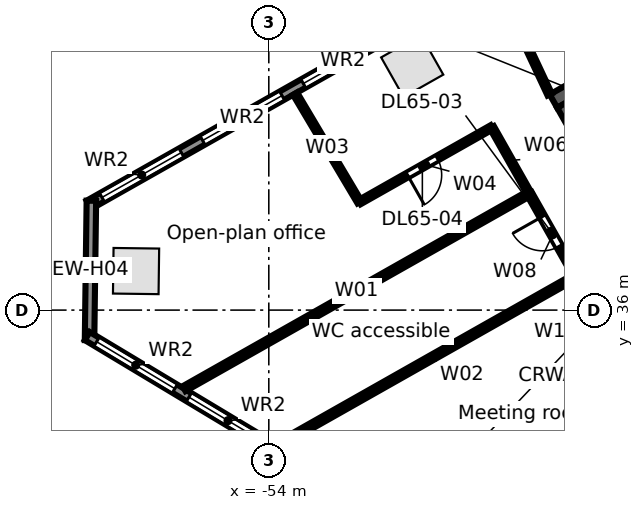
"""IFC4 building model, lengths in metres.
Left out: names, types, materials, properties, quantities, classifications, styles, units other than length and angle.
Written with IfcOpenShell. Run it as: python <this file> out.ifc"""

import sys

from ifc_helpers import new_model, si_unit, direction, frame, frame_2d, origin, origin_2d, place, context, subcontext, project, spatial, rectangle, extrude, element, fill, save


model = new_model("IFC4")
c1 = context("Model", 3, precision=1e-05, world=origin(), true_north=direction((0.0, 1.0)))
c2 = subcontext(c1, "Body", "Model", "MODEL_VIEW")
j1 = project(units=[si_unit("LENGTHUNIT", "METRE"), si_unit("PLANEANGLEUNIT", "RADIAN")], contexts=[c1])
p1 = place(None, origin())
s1 = spatial("IfcSite", under=j1, at=p1, CompositionType="ELEMENT")
p2 = place(p1, origin())
s2 = spatial("IfcBuilding", under=s1, at=p2, CompositionType="ELEMENT")
p3 = place(p2, frame((0.0, 0.0, 300.7)))
s3 = spatial("IfcBuildingStorey", under=s2, at=p3, CompositionType="ELEMENT", Elevation=300.7)
for number, where, z_axis, x_axis in (
    (1, (-50.226, 42.423, 0.0), (0.0, 0.0, 1.0), (-0.87, -0.492, 0.0)),
    (2, (-57.493, 37.027, 0.0), (0.0, 0.0, 1.0), (-0.013, -1.0, 0.0)),
):
    element("IfcColumn", number, at=place(p3, frame(where, z_axis=z_axis, x_axis=x_axis)), inside=s3, PredefinedType="COLUMN", context=c2, shape_type="SweptSolid", body=[
        extrude(rectangle(XDim=1.2, YDim=1.2, at=origin_2d()), origin(), (0.0, 0.0, 1.0), 3.8),
    ])
p4 = place(p3, frame((-58.732, 38.771, 0.0), z_axis=(0.0, 0.0, 1.0), x_axis=(0.870355615581, 0.492423702137, 0.0)))
e3 = element("IfcWall", 3, at=p4, inside=s3, PredefinedType="STANDARD", context=c2, shape_type="SweptSolid", body=[
    extrude(rectangle(XDim=64.052, YDim=0.25, at=frame_2d((32.026, 0.0))), origin(), (0.0, 0.0, 1.0), 3.52),
])
p5 = place(p4, frame((61.259, 0.0, 0.8)))
e4 = element("IfcOpeningElement", 4, at=p5, cuts=e3, PredefinedType="OPENING", context=c2, shape_type="SweptSolid", body=[
    extrude(rectangle(XDim=2.4, YDim=2.2, at=frame_2d((1.2, 1.1))), frame((0.0, 0.135, 0.0), z_axis=(0.0, -1.0, 0.0), x_axis=(1.0, 0.0, 0.0)), (0.0, 0.0, 1.0), 0.27),
])
p6 = place(p4, frame((58.216, 0.0, 0.8)))
e5 = element("IfcOpeningElement", 5, at=p6, cuts=e3, PredefinedType="OPENING", context=c2, shape_type="SweptSolid", body=[
    extrude(rectangle(XDim=2.4, YDim=2.2, at=frame_2d((1.2, 1.1))), frame((0.0, 0.135, 0.0), z_axis=(0.0, -1.0, 0.0), x_axis=(1.0, 0.0, 0.0)), (0.0, 0.0, 1.0), 0.27),
])
p7 = place(p4, frame((55.173, 0.0, 0.8)))
e6 = element("IfcOpeningElement", 6, at=p7, cuts=e3, PredefinedType="OPENING", context=c2, shape_type="SweptSolid", body=[
    extrude(rectangle(XDim=2.4, YDim=2.2, at=frame_2d((1.2, 1.1))), frame((0.0, 0.135, 0.0), z_axis=(0.0, -1.0, 0.0), x_axis=(1.0, 0.0, 0.0)), (0.0, 0.0, 1.0), 0.27),
])
p8 = place(p4, frame((52.129, 0.0, 0.8)))
e7 = element("IfcOpeningElement", 7, at=p8, cuts=e3, PredefinedType="OPENING", context=c2, shape_type="SweptSolid", body=[
    extrude(rectangle(XDim=2.4, YDim=2.2, at=frame_2d((1.2, 1.1))), frame((0.0, 0.135, 0.0), z_axis=(0.0, -1.0, 0.0), x_axis=(1.0, 0.0, 0.0)), (0.0, 0.0, 1.0), 0.27),
])
p9 = place(p4, frame((49.086, 0.0, 0.8)))
e8 = element("IfcOpeningElement", 8, at=p9, cuts=e3, PredefinedType="OPENING", context=c2, shape_type="SweptSolid", body=[
    extrude(rectangle(XDim=2.4, YDim=2.2, at=frame_2d((1.2, 1.1))), frame((0.0, 0.135, 0.0), z_axis=(0.0, -1.0, 0.0), x_axis=(1.0, 0.0, 0.0)), (0.0, 0.0, 1.0), 0.27),
])
p10 = place(p4, frame((46.043, 0.0, 0.8)))
e9 = element("IfcOpeningElement", 9, at=p10, cuts=e3, PredefinedType="OPENING", context=c2, shape_type="SweptSolid", body=[
    extrude(rectangle(XDim=2.4, YDim=2.2, at=frame_2d((1.2, 1.1))), frame((0.0, 0.135, 0.0), z_axis=(0.0, -1.0, 0.0), x_axis=(1.0, 0.0, 0.0)), (0.0, 0.0, 1.0), 0.27),
])
p11 = place(p4, frame((43.0, 0.0, 0.8)))
e10 = element("IfcOpeningElement", 10, at=p11, cuts=e3, PredefinedType="OPENING", context=c2, shape_type="SweptSolid", body=[
    extrude(rectangle(XDim=2.4, YDim=2.2, at=frame_2d((1.2, 1.1))), frame((0.0, 0.135, 0.0), z_axis=(0.0, -1.0, 0.0), x_axis=(1.0, 0.0, 0.0)), (0.0, 0.0, 1.0), 0.27),
])
p12 = place(p4, frame((39.956, 0.0, 0.8)))
e11 = element("IfcOpeningElement", 11, at=p12, cuts=e3, PredefinedType="OPENING", context=c2, shape_type="SweptSolid", body=[
    extrude(rectangle(XDim=2.4, YDim=2.2, at=frame_2d((1.2, 1.1))), frame((0.0, 0.135, 0.0), z_axis=(0.0, -1.0, 0.0), x_axis=(1.0, 0.0, 0.0)), (0.0, 0.0, 1.0), 0.27),
])
p13 = place(p4, frame((36.913, 0.0, 0.8)))
e12 = element("IfcOpeningElement", 12, at=p13, cuts=e3, PredefinedType="OPENING", context=c2, shape_type="SweptSolid", body=[
    extrude(rectangle(XDim=2.4, YDim=2.2, at=frame_2d((1.2, 1.1))), frame((0.0, 0.135, 0.0), z_axis=(0.0, -1.0, 0.0), x_axis=(1.0, 0.0, 0.0)), (0.0, 0.0, 1.0), 0.27),
])
p14 = place(p4, frame((33.87, 0.0, 0.8)))
e13 = element("IfcOpeningElement", 13, at=p14, cuts=e3, PredefinedType="OPENING", context=c2, shape_type="SweptSolid", body=[
    extrude(rectangle(XDim=2.4, YDim=2.2, at=frame_2d((1.2, 1.1))), frame((0.0, 0.135, 0.0), z_axis=(0.0, -1.0, 0.0), x_axis=(1.0, 0.0, 0.0)), (0.0, 0.0, 1.0), 0.27),
])
p15 = place(p4, frame((30.826, 0.0, 0.8)))
e14 = element("IfcOpeningElement", 14, at=p15, cuts=e3, PredefinedType="OPENING", context=c2, shape_type="SweptSolid", body=[
    extrude(rectangle(XDim=2.4, YDim=2.2, at=frame_2d((1.2, 1.1))), frame((0.0, 0.135, 0.0), z_axis=(0.0, -1.0, 0.0), x_axis=(1.0, 0.0, 0.0)), (0.0, 0.0, 1.0), 0.27),
])
p16 = place(p4, frame((27.783, 0.0, 0.8)))
e15 = element("IfcOpeningElement", 15, at=p16, cuts=e3, PredefinedType="OPENING", context=c2, shape_type="SweptSolid", body=[
    extrude(rectangle(XDim=2.4, YDim=2.2, at=frame_2d((1.2, 1.1))), frame((0.0, 0.135, 0.0), z_axis=(0.0, -1.0, 0.0), x_axis=(1.0, 0.0, 0.0)), (0.0, 0.0, 1.0), 0.27),
])
p17 = place(p4, frame((24.74, 0.0, 0.8)))
e16 = element("IfcOpeningElement", 16, at=p17, cuts=e3, PredefinedType="OPENING", context=c2, shape_type="SweptSolid", body=[
    extrude(rectangle(XDim=2.4, YDim=2.2, at=frame_2d((1.2, 1.1))), frame((0.0, 0.135, 0.0), z_axis=(0.0, -1.0, 0.0), x_axis=(1.0, 0.0, 0.0)), (0.0, 0.0, 1.0), 0.27),
])
p18 = place(p4, frame((21.696, 0.0, 0.8)))
e17 = element("IfcOpeningElement", 17, at=p18, cuts=e3, PredefinedType="OPENING", context=c2, shape_type="SweptSolid", body=[
    extrude(rectangle(XDim=2.4, YDim=2.2, at=frame_2d((1.2, 1.1))), frame((0.0, 0.135, 0.0), z_axis=(0.0, -1.0, 0.0), x_axis=(1.0, 0.0, 0.0)), (0.0, 0.0, 1.0), 0.27),
])
p19 = place(p4, frame((18.653, 0.0, 0.8)))
e18 = element("IfcOpeningElement", 18, at=p19, cuts=e3, PredefinedType="OPENING", context=c2, shape_type="SweptSolid", body=[
    extrude(rectangle(XDim=2.4, YDim=2.2, at=frame_2d((1.2, 1.1))), frame((0.0, 0.135, 0.0), z_axis=(0.0, -1.0, 0.0), x_axis=(1.0, 0.0, 0.0)), (0.0, 0.0, 1.0), 0.27),
])
p20 = place(p4, frame((15.61, 0.0, 0.8)))
e19 = element("IfcOpeningElement", 19, at=p20, cuts=e3, PredefinedType="OPENING", context=c2, shape_type="SweptSolid", body=[
    extrude(rectangle(XDim=2.4, YDim=2.2, at=frame_2d((1.2, 1.1))), frame((0.0, 0.135, 0.0), z_axis=(0.0, -1.0, 0.0), x_axis=(1.0, 0.0, 0.0)), (0.0, 0.0, 1.0), 0.27),
])
p21 = place(p4, frame((12.567, 0.0, 0.8)))
e20 = element("IfcOpeningElement", 20, at=p21, cuts=e3, PredefinedType="OPENING", context=c2, shape_type="SweptSolid", body=[
    extrude(rectangle(XDim=2.4, YDim=2.2, at=frame_2d((1.2, 1.1))), frame((0.0, 0.135, 0.0), z_axis=(0.0, -1.0, 0.0), x_axis=(1.0, 0.0, 0.0)), (0.0, 0.0, 1.0), 0.27),
])
p22 = place(p4, frame((9.523, 0.0, 0.8)))
e21 = element("IfcOpeningElement", 21, at=p22, cuts=e3, PredefinedType="OPENING", context=c2, shape_type="SweptSolid", body=[
    extrude(rectangle(XDim=2.4, YDim=2.2, at=frame_2d((1.2, 1.1))), frame((0.0, 0.135, 0.0), z_axis=(0.0, -1.0, 0.0), x_axis=(1.0, 0.0, 0.0)), (0.0, 0.0, 1.0), 0.27),
])
p23 = place(p4, frame((6.48, 0.0, 0.8)))
e22 = element("IfcOpeningElement", 22, at=p23, cuts=e3, PredefinedType="OPENING", context=c2, shape_type="SweptSolid", body=[
    extrude(rectangle(XDim=2.4, YDim=2.2, at=frame_2d((1.2, 1.1))), frame((0.0, 0.135, 0.0), z_axis=(0.0, -1.0, 0.0), x_axis=(1.0, 0.0, 0.0)), (0.0, 0.0, 1.0), 0.27),
])
p24 = place(p4, frame((3.437, 0.0, 0.8)))
e23 = element("IfcOpeningElement", 23, at=p24, cuts=e3, PredefinedType="OPENING", context=c2, shape_type="SweptSolid", body=[
    extrude(rectangle(XDim=2.4, YDim=2.2, at=frame_2d((1.2, 1.1))), frame((0.0, 0.135, 0.0), z_axis=(0.0, -1.0, 0.0), x_axis=(1.0, 0.0, 0.0)), (0.0, 0.0, 1.0), 0.27),
])
p25 = place(p4, frame((0.393, 0.0, 0.8)))
e24 = element("IfcOpeningElement", 24, at=p25, cuts=e3, PredefinedType="OPENING", context=c2, shape_type="SweptSolid", body=[
    extrude(rectangle(XDim=2.4, YDim=2.2, at=frame_2d((1.2, 1.1))), frame((0.0, 0.135, 0.0), z_axis=(0.0, -1.0, 0.0), x_axis=(1.0, 0.0, 0.0)), (0.0, 0.0, 1.0), 0.27),
])
p26 = place(p3, frame((-58.717, 35.208, 0.0), z_axis=(0.0, 0.0, 1.0), x_axis=(0.01310512158, 0.999914124207, 0.0)))
e25 = element("IfcWall", 25, at=p26, inside=s3, PredefinedType="STANDARD", context=c2, shape_type="SweptSolid", body=[
    extrude(rectangle(XDim=3.67, YDim=0.25, at=frame_2d((1.835, 0.0))), origin(), (0.0, 0.0, 1.0), 3.52),
])
p27 = place(p3, frame((-44.115, 26.507, 0.0), z_axis=(0.0, 0.0, 1.0), x_axis=(-0.857166583633, 0.515039268311, 0.0)))
e26 = element("IfcWall", 26, at=p27, inside=s3, PredefinedType="STANDARD", context=c2, shape_type="SweptSolid", body=[
    extrude(rectangle(XDim=17.106, YDim=0.25, at=frame_2d((8.553, 0.0))), origin(), (0.0, 0.0, 1.0), 3.52),
])
p28 = place(p27, frame((14.417, 0.0, 0.8)))
e27 = element("IfcOpeningElement", 27, at=p28, cuts=e26, PredefinedType="OPENING", context=c2, shape_type="SweptSolid", body=[
    extrude(rectangle(XDim=2.4, YDim=2.2, at=frame_2d((1.2, 1.1))), frame((0.0, 0.135, 0.0), z_axis=(0.0, -1.0, 0.0), x_axis=(1.0, 0.0, 0.0)), (0.0, 0.0, 1.0), 0.27),
])
p29 = place(p27, frame((11.584, 0.0, 0.8)))
e28 = element("IfcOpeningElement", 28, at=p29, cuts=e26, PredefinedType="OPENING", context=c2, shape_type="SweptSolid", body=[
    extrude(rectangle(XDim=2.4, YDim=2.2, at=frame_2d((1.2, 1.1))), frame((0.0, 0.135, 0.0), z_axis=(0.0, -1.0, 0.0), x_axis=(1.0, 0.0, 0.0)), (0.0, 0.0, 1.0), 0.27),
])
p30 = place(p27, frame((8.75, 0.0, 0.8)))
e29 = element("IfcOpeningElement", 29, at=p30, cuts=e26, PredefinedType="OPENING", context=c2, shape_type="SweptSolid", body=[
    extrude(rectangle(XDim=2.4, YDim=2.2, at=frame_2d((1.2, 1.1))), frame((0.0, 0.135, 0.0), z_axis=(0.0, -1.0, 0.0), x_axis=(1.0, 0.0, 0.0)), (0.0, 0.0, 1.0), 0.27),
])
p31 = place(p27, frame((5.917, 0.0, 0.8)))
e30 = element("IfcOpeningElement", 30, at=p31, cuts=e26, PredefinedType="OPENING", context=c2, shape_type="SweptSolid", body=[
    extrude(rectangle(XDim=2.4, YDim=2.2, at=frame_2d((1.2, 1.1))), frame((0.0, 0.135, 0.0), z_axis=(0.0, -1.0, 0.0), x_axis=(1.0, 0.0, 0.0)), (0.0, 0.0, 1.0), 0.27),
])
p32 = place(p27, frame((3.084, 0.0, 0.8)))
e31 = element("IfcOpeningElement", 31, at=p32, cuts=e26, PredefinedType="OPENING", context=c2, shape_type="SweptSolid", body=[
    extrude(rectangle(XDim=2.4, YDim=2.2, at=frame_2d((1.2, 1.1))), frame((0.0, 0.135, 0.0), z_axis=(0.0, -1.0, 0.0), x_axis=(1.0, 0.0, 0.0)), (0.0, 0.0, 1.0), 0.27),
])
p33 = place(p27, frame((0.25, 0.0, 0.8)))
e32 = element("IfcOpeningElement", 32, at=p33, cuts=e26, PredefinedType="OPENING", context=c2, shape_type="SweptSolid", body=[
    extrude(rectangle(XDim=2.4, YDim=2.2, at=frame_2d((1.2, 1.1))), frame((0.0, 0.135, 0.0), z_axis=(0.0, -1.0, 0.0), x_axis=(1.0, 0.0, 0.0)), (0.0, 0.0, 1.0), 0.27),
])
p34 = place(p3, frame((-46.51, 41.499, 0.0), z_axis=(0.0, 0.0, 1.0), x_axis=(0.870356271124, 0.492422543467, 0.0)))
e33 = element("IfcWall", 33, at=p34, inside=s3, PredefinedType="SOLIDWALL", context=c2, shape_type="SweptSolid", body=[
    extrude(rectangle(XDim=17.0, YDim=0.4, at=frame_2d((8.5, 0.0))), origin(), (0.0, 0.0, 1.0), 3.52),
])
p35 = place(p3, frame((-46.238, 41.423, 0.0), z_axis=(0.0, 0.0, 1.0), x_axis=(0.492421663121, -0.870356769198, 0.0)))
e34 = element("IfcWall", 34, at=p35, inside=s3, PredefinedType="SOLIDWALL", context=c2, shape_type="SweptSolid", body=[
    extrude(rectangle(XDim=13.2, YDim=0.4, at=frame_2d((6.6, 0.0))), origin(), (0.0, 0.0, 1.0), 3.52),
])
p36 = place(p3, frame((-56.229, 33.932, 0.0), z_axis=(0.0, 0.0, 1.0), x_axis=(0.870363189886, 0.492410314364, 0.0)))
e35 = element("IfcWall", 35, at=p36, inside=s3, PredefinedType="PARTITIONING", context=c2, shape_type="SweptSolid", body=[
    extrude(rectangle(XDim=10.435, YDim=0.15, at=frame_2d((5.217, 0.0))), origin(), (0.0, 0.0, 1.0), 2.8),
])
p37 = place(p3, frame((-53.767, 32.453, 0.0), z_axis=(0.0, 0.0, 1.0), x_axis=(0.870345499828, 0.492441581235, 0.0)))
e36 = element("IfcWall", 36, at=p37, inside=s3, PredefinedType="PARTITIONING", context=c2, shape_type="SweptSolid", body=[
    extrude(rectangle(XDim=9.021, YDim=0.15, at=frame_2d((4.51, 0.0))), origin(), (0.0, 0.0, 1.0), 2.8),
])
p38 = place(p3, frame((-53.309, 41.696, 0.0), z_axis=(0.0, 0.0, 1.0), x_axis=(0.510739180143, -0.859735709312, 0.0)))
e37 = element("IfcWall", 37, at=p38, inside=s3, PredefinedType="PARTITIONING", context=c2, shape_type="SweptSolid", body=[
    extrude(rectangle(XDim=3.321, YDim=0.125, at=frame_2d((1.66, 0.0))), origin(), (0.0, 0.0, 1.0), 2.894),
])
p39 = place(p3, frame((-51.613, 38.841, 0.0), z_axis=(0.0, 0.0, 1.0), x_axis=(0.870297830159, 0.492525823506, 0.0)))
e38 = element("IfcWall", 38, at=p39, inside=s3, PredefinedType="PARTITIONING", context=c2, shape_type="SweptSolid", body=[
    extrude(rectangle(XDim=4.0, YDim=0.125, at=frame_2d((2.0, 0.0))), origin(), (0.0, 0.0, 1.0), 2.8),
])
p40 = place(p39, frame((1.45, 0.0, 0.0)))
e39 = element("IfcOpeningElement", 39, at=p40, cuts=e38, PredefinedType="OPENING", context=c2, shape_type="SweptSolid", body=[
    extrude(rectangle(XDim=0.9, YDim=2.1, at=frame_2d((0.45, 1.05))), frame((0.0, 0.073, 0.0), z_axis=(0.0, -1.0, 0.0), x_axis=(1.0, 0.0, 0.0)), (0.0, 0.0, 1.0), 0.145),
])
p41 = place(p3, frame((-48.132, 40.811, 0.0), z_axis=(0.0, 0.0, 1.0), x_axis=(0.492467412326, -0.870330884088, 0.0)))
e40 = element("IfcWall", 40, at=p41, inside=s3, PredefinedType="PARTITIONING", context=c2, shape_type="SweptSolid", body=[
    extrude(rectangle(XDim=2.0, YDim=0.125, at=frame_2d((1.0, 0.0))), origin(), (0.0, 0.0, 1.0), 3.52),
])
p42 = place(p3, frame((-48.022, 44.687, 0.0), z_axis=(0.0, 0.0, 1.0), x_axis=(0.424510917438, -0.905422818895, 0.0)))
e41 = element("IfcWall", 41, at=p42, inside=s3, PredefinedType="PARTITIONING", context=c2, shape_type="SweptSolid", body=[
    extrude(rectangle(XDim=3.329, YDim=0.125, at=frame_2d((1.665, 0.0))), origin(), (0.0, 0.0, 1.0), 2.888),
])
p43 = place(p3, frame((-47.147, 39.07, 0.0), z_axis=(0.0, 0.0, 1.0), x_axis=(0.492536798944, -0.870291618761, 0.0)))
e42 = element("IfcWall", 42, at=p43, inside=s3, PredefinedType="PARTITIONING", context=c2, shape_type="SweptSolid", body=[
    extrude(rectangle(XDim=2.499, YDim=0.15, at=frame_2d((1.25, 0.0))), origin(), (0.0, 0.0, 1.0), 3.52),
])
p44 = place(p43, frame((0.7, 0.0, 0.0)))
e43 = element("IfcOpeningElement", 43, at=p44, cuts=e42, PredefinedType="OPENING", context=c2, shape_type="SweptSolid", body=[
    extrude(rectangle(XDim=0.9, YDim=2.1, at=frame_2d((0.45, 1.05))), frame((0.0, 0.085, 0.0), z_axis=(0.0, -1.0, 0.0), x_axis=(1.0, 0.0, 0.0)), (0.0, 0.0, 1.0), 0.17),
])
p45 = place(p23, origin())
e44 = element("IfcWindow", 44, at=p45, inside=s3, PartitioningType="SINGLE_PANEL", PredefinedType="WINDOW", context=c2, shape_type="SweptSolid", body=[
    extrude(rectangle(XDim=2.4, YDim=2.2, at=frame_2d((1.2, 1.1))), frame((0.0, 0.03, 0.0), z_axis=(0.0, -1.0, 0.0), x_axis=(1.0, 0.0, 0.0)), (0.0, 0.0, 1.0), 0.06),
])
fill(e22, e44)
p46 = place(p24, origin())
e45 = element("IfcWindow", 45, at=p46, inside=s3, PartitioningType="SINGLE_PANEL", PredefinedType="WINDOW", context=c2, shape_type="SweptSolid", body=[
    extrude(rectangle(XDim=2.4, YDim=2.2, at=frame_2d((1.2, 1.1))), frame((0.0, 0.03, 0.0), z_axis=(0.0, -1.0, 0.0), x_axis=(1.0, 0.0, 0.0)), (0.0, 0.0, 1.0), 0.06),
])
fill(e23, e45)
p47 = place(p25, origin())
e46 = element("IfcWindow", 46, at=p47, inside=s3, PartitioningType="SINGLE_PANEL", PredefinedType="WINDOW", context=c2, shape_type="SweptSolid", body=[
    extrude(rectangle(XDim=2.4, YDim=2.2, at=frame_2d((1.2, 1.1))), frame((0.0, 0.03, 0.0), z_axis=(0.0, -1.0, 0.0), x_axis=(1.0, 0.0, 0.0)), (0.0, 0.0, 1.0), 0.06),
])
fill(e24, e46)
p48 = place(p28, origin())
e47 = element("IfcWindow", 47, at=p48, inside=s3, PartitioningType="SINGLE_PANEL", PredefinedType="WINDOW", context=c2, shape_type="SweptSolid", body=[
    extrude(rectangle(XDim=2.4, YDim=2.2, at=frame_2d((1.2, 1.1))), frame((0.0, 0.03, 0.0), z_axis=(0.0, -1.0, 0.0), x_axis=(1.0, 0.0, 0.0)), (0.0, 0.0, 1.0), 0.06),
])
fill(e27, e47)
p49 = place(p29, origin())
e48 = element("IfcWindow", 48, at=p49, inside=s3, PartitioningType="SINGLE_PANEL", PredefinedType="WINDOW", context=c2, shape_type="SweptSolid", body=[
    extrude(rectangle(XDim=2.4, YDim=2.2, at=frame_2d((1.2, 1.1))), frame((0.0, 0.03, 0.0), z_axis=(0.0, -1.0, 0.0), x_axis=(1.0, 0.0, 0.0)), (0.0, 0.0, 1.0), 0.06),
])
fill(e28, e48)
p50 = place(p44, frame((0.9, 0.0, 0.0), z_axis=(0.0, 0.0, 1.0), x_axis=(-1.0, 0.0, 0.0)))
e49 = element("IfcDoor", 49, at=p50, inside=s3, OperationType="SINGLE_SWING_RIGHT", PredefinedType="DOOR", context=c2, shape_type="SweptSolid", body=[
    extrude(rectangle(XDim=0.9, YDim=2.1, at=frame_2d((0.45, 1.05))), frame((0.0, 0.025, 0.0), z_axis=(0.0, -1.0, 0.0), x_axis=(1.0, 0.0, 0.0)), (0.0, 0.0, 1.0), 0.05),
])
fill(e43, e49)
p51 = place(p40, frame((0.9, 0.0, 0.0), z_axis=(0.0, 0.0, 1.0), x_axis=(-1.0, 0.0, 0.0)))
e50 = element("IfcDoor", 50, at=p51, inside=s3, OperationType="SINGLE_SWING_RIGHT", PredefinedType="DOOR", context=c2, shape_type="SweptSolid", body=[
    extrude(rectangle(XDim=0.9, YDim=2.1, at=frame_2d((0.45, 1.05))), frame((0.0, 0.025, 0.0), z_axis=(0.0, -1.0, 0.0), x_axis=(1.0, 0.0, 0.0)), (0.0, 0.0, 1.0), 0.05),
])
fill(e39, e50)
save(model, sys.argv[1])
